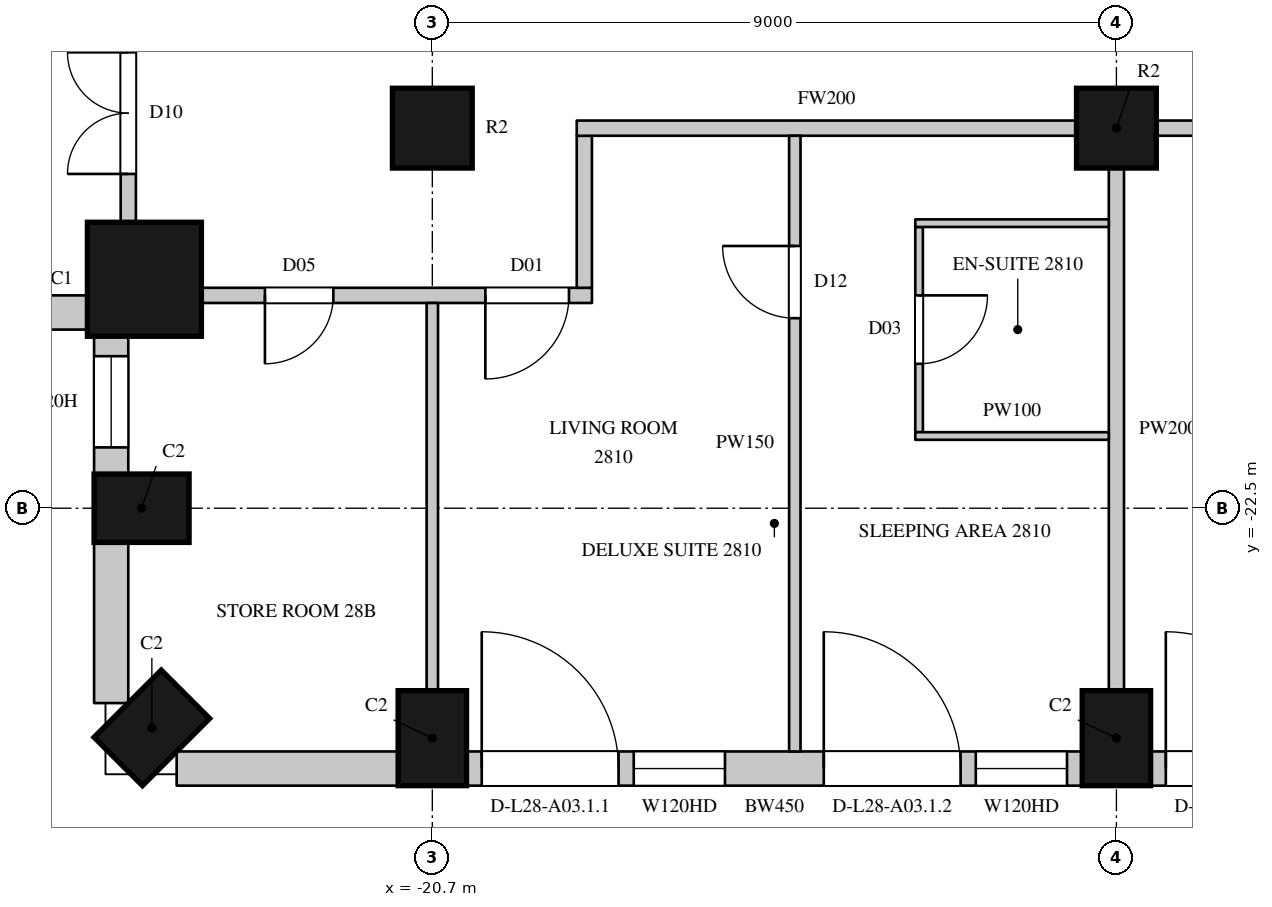
"""IFC4 building model, lengths in metres.
Left out: names, types, materials, properties, quantities, classifications, styles, units other than length and angle.
Written with IfcOpenShell. Run it as: python <this file> out.ifc"""

import sys

from ifc_helpers import new_model, si_unit, direction, frame, frame_2d, origin, origin_2d, place, context, subcontext, project, spatial, rectangle, circle, extrude, element, fill, save


model = new_model("IFC4")
c1 = context("Model", 3, precision=1e-05, world=origin(), true_north=direction((0.0, 1.0)))
c2 = subcontext(c1, "Body", "Model", "MODEL_VIEW")
j1 = project(units=[si_unit("LENGTHUNIT", "METRE"), si_unit("PLANEANGLEUNIT", "RADIAN")], contexts=[c1])
p1 = place(None, origin())
s1 = spatial("IfcSite", under=j1, at=p1, CompositionType="ELEMENT")
p2 = place(p1, origin())
s2 = spatial("IfcBuilding", under=s1, at=p2, CompositionType="ELEMENT")
p3 = place(p2, frame((0.0, 0.0, 131.1)))
s3 = spatial("IfcBuildingStorey", under=s2, at=p3, CompositionType="ELEMENT", Elevation=131.1)
p4 = place(p3, frame((-24.488, -19.488, 0.0), z_axis=(0.0, 0.0, 1.0), x_axis=(1.0, 0.0, 0.0)))
e1 = element("IfcColumn", 1, at=p4, inside=s3, PredefinedType="COLUMN", context=c2, shape_type="SweptSolid", body=[
    extrude(circle(Radius=0.75, at=origin_2d()), origin(), (0.0, 0.0, 1.0), 3.6),
])
for number, where, z_axis, x_axis in (
    (2, (-24.525, -22.5, 0.0), (0.0, 0.0, 1.0), (0.0, -1.0, 0.0)),
    (3, (-24.39, -25.39, 0.0), (0.0, 0.0, 1.0), (0.707, -0.707, 0.0)),
    (4, (-20.7, -25.525, 0.0), (0.0, 0.0, 1.0), (1.0, 0.0, 0.0)),
    (5, (-11.7, -25.525, 0.0), (0.0, 0.0, 1.0), (1.0, 0.0, 0.0)),
):
    element("IfcColumn", number, at=place(p3, frame(where, z_axis=z_axis, x_axis=x_axis)), inside=s3, PredefinedType="COLUMN", context=c2, shape_type="SweptSolid", body=[
        extrude(rectangle(XDim=0.9, YDim=1.25, at=origin_2d()), origin(), (0.0, 0.0, 1.0), 3.6),
    ])
for number, where, z_axis, x_axis in (
    (6, (-20.7, -17.5, 0.0), (0.0, 0.0, 1.0), (1.0, 0.0, 0.0)),
    (7, (-11.7, -17.5, 0.0), (0.0, 0.0, 1.0), (1.0, 0.0, 0.0)),
):
    element("IfcColumn", number, at=place(p3, frame(where, z_axis=z_axis, x_axis=x_axis)), inside=s3, PredefinedType="COLUMN", context=c2, shape_type="SweptSolid", body=[
        extrude(circle(Radius=0.525, at=origin_2d()), origin(), (0.0, 0.0, 1.0), 3.6),
    ])
p5 = place(p3, frame((-29.064, -19.925, 0.0), z_axis=(0.0, 0.0, 1.0), x_axis=(1.0, 0.0, 0.0)))
e8 = element("IfcWall", 8, at=p5, inside=s3, PredefinedType="SOLIDWALL", context=c2, shape_type="SweptSolid", body=[
    extrude(rectangle(XDim=3.857, YDim=0.45, at=frame_2d((1.928, 0.0))), origin(), (0.0, 0.0, 1.0), 3.3),
])
p6 = place(p5, frame((0.514, 0.0, 1.05)))
e9 = element("IfcOpeningElement", 9, at=p6, cuts=e8, PredefinedType="OPENING", context=c2, shape_type="SweptSolid", body=[
    extrude(rectangle(XDim=2.7, YDim=2.0, at=frame_2d((1.35, 1.0))), frame((0.0, 0.235, 0.0), z_axis=(0.0, -1.0, 0.0), x_axis=(1.0, 0.0, 0.0)), (0.0, 0.0, 1.0), 0.47),
])
p7 = place(p3, frame((-24.925, -20.207, 0.0), z_axis=(0.0, 0.0, 1.0), x_axis=(0.0, -1.0, 0.0)))
e10 = element("IfcWall", 10, at=p7, inside=s3, PredefinedType="SOLIDWALL", context=c2, shape_type="SweptSolid", body=[
    extrude(rectangle(XDim=1.843, YDim=0.45, at=frame_2d((0.921, 0.0))), origin(), (0.0, 0.0, 1.0), 3.3),
])
p8 = place(p7, frame((0.293, 0.0, 1.05)))
e11 = element("IfcOpeningElement", 11, at=p8, cuts=e10, PredefinedType="OPENING", context=c2, shape_type="SweptSolid", body=[
    extrude(rectangle(XDim=1.2, YDim=2.0, at=frame_2d((0.6, 1.0))), frame((0.0, 0.235, 0.0), z_axis=(0.0, -1.0, 0.0), x_axis=(1.0, 0.0, 0.0)), (0.0, 0.0, 1.0), 0.47),
])
p9 = place(p3, frame((-24.925, -22.95, 0.0), z_axis=(0.0, 0.0, 1.0), x_axis=(0.0, -1.0, 0.0)))
e12 = element("IfcWall", 12, at=p9, inside=s3, PredefinedType="SOLIDWALL", context=c2, shape_type="SweptSolid", body=[
    extrude(rectangle(XDim=2.114, YDim=0.45, at=frame_2d((1.057, 0.0))), origin(), (0.0, 0.0, 1.0), 3.3),
])
p10 = place(p3, frame((-24.064, -25.925, 0.0), z_axis=(0.0, 0.0, 1.0), x_axis=(1.0, 0.0, 0.0)))
e13 = element("IfcWall", 13, at=p10, inside=s3, PredefinedType="SOLIDWALL", context=c2, shape_type="SweptSolid", body=[
    extrude(rectangle(XDim=2.914, YDim=0.45, at=frame_2d((1.457, 0.0))), origin(), (0.0, 0.0, 1.0), 3.3),
])
p11 = place(p3, frame((-20.25, -25.925, 0.0), z_axis=(0.0, 0.0, 1.0), x_axis=(1.0, 0.0, 0.0)))
e14 = element("IfcWall", 14, at=p11, inside=s3, PredefinedType="SOLIDWALL", context=c2, shape_type="SweptSolid", body=[
    extrude(rectangle(XDim=8.1, YDim=0.45, at=frame_2d((4.05, 0.0))), origin(), (0.0, 0.0, 1.0), 3.3),
])
p12 = place(p11, frame((0.2, 0.0, 0.0)))
e15 = element("IfcOpeningElement", 15, at=p12, cuts=e14, PredefinedType="OPENING", context=c2, shape_type="SweptSolid", body=[
    extrude(rectangle(XDim=1.8, YDim=2.4, at=frame_2d((0.9, 1.2))), frame((0.0, 0.235, 0.0), z_axis=(0.0, -1.0, 0.0), x_axis=(1.0, 0.0, 0.0)), (0.0, 0.0, 1.0), 0.47),
])
p13 = place(p11, frame((2.2, 0.0, 1.05)))
e16 = element("IfcOpeningElement", 16, at=p13, cuts=e14, PredefinedType="OPENING", context=c2, shape_type="SweptSolid", body=[
    extrude(rectangle(XDim=1.2, YDim=2.0, at=frame_2d((0.6, 1.0))), frame((0.0, 0.235, 0.0), z_axis=(0.0, -1.0, 0.0), x_axis=(1.0, 0.0, 0.0)), (0.0, 0.0, 1.0), 0.47),
])
p14 = place(p11, frame((4.7, 0.0, 0.0)))
e17 = element("IfcOpeningElement", 17, at=p14, cuts=e14, PredefinedType="OPENING", context=c2, shape_type="SweptSolid", body=[
    extrude(rectangle(XDim=1.8, YDim=2.4, at=frame_2d((0.9, 1.2))), frame((0.0, 0.235, 0.0), z_axis=(0.0, -1.0, 0.0), x_axis=(1.0, 0.0, 0.0)), (0.0, 0.0, 1.0), 0.47),
])
p15 = place(p11, frame((6.7, 0.0, 1.05)))
e18 = element("IfcOpeningElement", 18, at=p15, cuts=e14, PredefinedType="OPENING", context=c2, shape_type="SweptSolid", body=[
    extrude(rectangle(XDim=1.2, YDim=2.0, at=frame_2d((0.6, 1.0))), frame((0.0, 0.235, 0.0), z_axis=(0.0, -1.0, 0.0), x_axis=(1.0, 0.0, 0.0)), (0.0, 0.0, 1.0), 0.47),
])
p16 = place(p3, frame((-11.25, -25.925, 0.0), z_axis=(0.0, 0.0, 1.0), x_axis=(1.0, 0.0, 0.0)))
e19 = element("IfcWall", 19, at=p16, inside=s3, PredefinedType="SOLIDWALL", context=c2, shape_type="SweptSolid", body=[
    extrude(rectangle(XDim=8.1, YDim=0.45, at=frame_2d((4.05, 0.0))), origin(), (0.0, 0.0, 1.0), 3.3),
])
p17 = place(p16, frame((0.2, 0.0, 0.0)))
e20 = element("IfcOpeningElement", 20, at=p17, cuts=e19, PredefinedType="OPENING", context=c2, shape_type="SweptSolid", body=[
    extrude(rectangle(XDim=1.8, YDim=2.4, at=frame_2d((0.9, 1.2))), frame((0.0, 0.235, 0.0), z_axis=(0.0, -1.0, 0.0), x_axis=(1.0, 0.0, 0.0)), (0.0, 0.0, 1.0), 0.47),
])
p18 = place(p16, frame((2.2, 0.0, 1.05)))
e21 = element("IfcOpeningElement", 21, at=p18, cuts=e19, PredefinedType="OPENING", context=c2, shape_type="SweptSolid", body=[
    extrude(rectangle(XDim=1.2, YDim=2.0, at=frame_2d((0.6, 1.0))), frame((0.0, 0.235, 0.0), z_axis=(0.0, -1.0, 0.0), x_axis=(1.0, 0.0, 0.0)), (0.0, 0.0, 1.0), 0.47),
])
p19 = place(p16, frame((4.25, 0.0, 0.0)))
e22 = element("IfcOpeningElement", 22, at=p19, cuts=e19, PredefinedType="OPENING", context=c2, shape_type="SweptSolid", body=[
    extrude(rectangle(XDim=1.8, YDim=2.4, at=frame_2d((0.9, 1.2))), frame((0.0, 0.235, 0.0), z_axis=(0.0, -1.0, 0.0), x_axis=(1.0, 0.0, 0.0)), (0.0, 0.0, 1.0), 0.47),
])
p20 = place(p16, frame((6.7, 0.0, 1.05)))
e23 = element("IfcOpeningElement", 23, at=p20, cuts=e19, PredefinedType="OPENING", context=c2, shape_type="SweptSolid", body=[
    extrude(rectangle(XDim=1.2, YDim=2.0, at=frame_2d((0.6, 1.0))), frame((0.0, 0.235, 0.0), z_axis=(0.0, -1.0, 0.0), x_axis=(1.0, 0.0, 0.0)), (0.0, 0.0, 1.0), 0.47),
])
p21 = place(p3, frame((-24.7, -18.752, 0.0), z_axis=(0.0, 0.0, 1.0), x_axis=(0.0, 1.0, 0.0)))
e24 = element("IfcWall", 24, at=p21, inside=s3, PredefinedType="PARTITIONING", context=c2, shape_type="SweptSolid", body=[
    extrude(rectangle(XDim=2.722, YDim=0.2, at=frame_2d((1.361, 0.0))), origin(), (0.0, 0.0, 1.0), 3.3),
])
p22 = place(p21, frame((0.65, 0.0, 0.0)))
e25 = element("IfcOpeningElement", 25, at=p22, cuts=e24, PredefinedType="OPENING", context=c2, shape_type="SweptSolid", body=[
    extrude(rectangle(XDim=1.6, YDim=2.4, at=frame_2d((0.8, 1.2))), frame((0.0, 0.11, 0.0), z_axis=(0.0, -1.0, 0.0), x_axis=(1.0, 0.0, 0.0)), (0.0, 0.0, 1.0), 0.22),
])
p23 = place(p3, frame((-23.752, -19.7, 0.0), z_axis=(0.0, 0.0, 1.0), x_axis=(1.0, 0.0, 0.0)))
e26 = element("IfcWall", 26, at=p23, inside=s3, PredefinedType="PARTITIONING", context=c2, shape_type="SweptSolid", body=[
    extrude(rectangle(XDim=5.152, YDim=0.2, at=frame_2d((2.576, 0.0))), origin(), (0.0, 0.0, 1.0), 3.3),
])
p24 = place(p23, frame((0.85, 0.0, 0.0)))
e27 = element("IfcOpeningElement", 27, at=p24, cuts=e26, PredefinedType="OPENING", context=c2, shape_type="SweptSolid", body=[
    extrude(rectangle(XDim=0.9, YDim=2.2, at=frame_2d((0.45, 1.1))), frame((0.0, 0.11, 0.0), z_axis=(0.0, -1.0, 0.0), x_axis=(1.0, 0.0, 0.0)), (0.0, 0.0, 1.0), 0.22),
])
p25 = place(p23, frame((3.75, 0.0, 0.0)))
e28 = element("IfcOpeningElement", 28, at=p25, cuts=e26, PredefinedType="OPENING", context=c2, shape_type="SweptSolid", body=[
    extrude(rectangle(XDim=1.1, YDim=2.4, at=frame_2d((0.55, 1.2))), frame((0.0, 0.11, 0.0), z_axis=(0.0, -1.0, 0.0), x_axis=(1.0, 0.0, 0.0)), (0.0, 0.0, 1.0), 0.22),
])
p26 = place(p3, frame((-18.7, -19.6, 0.0), z_axis=(0.0, 0.0, 1.0), x_axis=(0.0, 1.0, 0.0)))
e29 = element("IfcWall", 29, at=p26, inside=s3, PredefinedType="PARTITIONING", context=c2, shape_type="SweptSolid", body=[
    extrude(rectangle(XDim=2.0, YDim=0.2, at=frame_2d((1.0, 0.0))), origin(), (0.0, 0.0, 1.0), 3.3),
])
p27 = place(p3, frame((-18.8, -17.5, 0.0), z_axis=(0.0, 0.0, 1.0), x_axis=(1.0, 0.0, 0.0)))
e30 = element("IfcWall", 30, at=p27, inside=s3, PredefinedType="PARTITIONING", context=c2, shape_type="SweptSolid", body=[
    extrude(rectangle(XDim=6.575, YDim=0.2, at=frame_2d((3.288, 0.0))), origin(), (0.0, 0.0, 1.0), 2.75),
])
p28 = place(p3, frame((-11.175, -17.5, 0.0), z_axis=(0.0, 0.0, 1.0), x_axis=(1.0, 0.0, 0.0)))
e31 = element("IfcWall", 31, at=p28, inside=s3, PredefinedType="PARTITIONING", context=c2, shape_type="SweptSolid", body=[
    extrude(rectangle(XDim=7.95, YDim=0.2, at=frame_2d((3.975, 0.0))), origin(), (0.0, 0.0, 1.0), 2.75),
])
p29 = place(p28, frame((2.75, 0.0, 0.0)))
e32 = element("IfcOpeningElement", 32, at=p29, cuts=e31, PredefinedType="OPENING", context=c2, shape_type="SweptSolid", body=[
    extrude(rectangle(XDim=1.1, YDim=2.4, at=frame_2d((0.55, 1.2))), frame((0.0, 0.11, 0.0), z_axis=(0.0, -1.0, 0.0), x_axis=(1.0, 0.0, 0.0)), (0.0, 0.0, 1.0), 0.22),
])
p30 = place(p3, frame((-20.7, -24.9, 0.0), z_axis=(0.0, 0.0, 1.0), x_axis=(0.0, 1.0, 0.0)))
e33 = element("IfcWall", 33, at=p30, inside=s3, PredefinedType="PARTITIONING", context=c2, shape_type="SweptSolid", body=[
    extrude(rectangle(XDim=5.1, YDim=0.15, at=frame_2d((2.55, 0.0))), origin(), (0.0, 0.0, 1.0), 2.75),
])
p31 = place(p3, frame((-15.931, -25.7, 0.0), z_axis=(0.0, 0.0, 1.0), x_axis=(0.0, 1.0, 0.0)))
e34 = element("IfcWall", 34, at=p31, inside=s3, PredefinedType="PARTITIONING", context=c2, shape_type="SweptSolid", body=[
    extrude(rectangle(XDim=8.1, YDim=0.15, at=frame_2d((4.05, 0.0))), origin(), (0.0, 0.0, 1.0), 3.3),
])
p32 = place(p31, frame((5.7, 0.0, 0.0)))
e35 = element("IfcOpeningElement", 35, at=p32, cuts=e34, PredefinedType="OPENING", context=c2, shape_type="SweptSolid", body=[
    extrude(rectangle(XDim=0.95, YDim=2.2, at=frame_2d((0.475, 1.1))), frame((0.0, 0.085, 0.0), z_axis=(0.0, -1.0, 0.0), x_axis=(1.0, 0.0, 0.0)), (0.0, 0.0, 1.0), 0.17),
])
p33 = place(p3, frame((-11.7, -24.9, 0.0), z_axis=(0.0, 0.0, 1.0), x_axis=(0.0, 1.0, 0.0)))
e36 = element("IfcWall", 36, at=p33, inside=s3, PredefinedType="PARTITIONING", context=c2, shape_type="SweptSolid", body=[
    extrude(rectangle(XDim=6.875, YDim=0.2, at=frame_2d((3.438, 0.0))), origin(), (0.0, 0.0, 1.0), 2.75),
])
p34 = place(p3, frame((-14.296, -21.5, 0.0), z_axis=(0.0, 0.0, 1.0), x_axis=(0.0, 1.0, 0.0)))
e37 = element("IfcWall", 37, at=p34, inside=s3, PredefinedType="PARTITIONING", context=c2, shape_type="SweptSolid", body=[
    extrude(rectangle(XDim=2.7, YDim=0.1, at=frame_2d((1.35, 0.0))), origin(), (0.0, 0.0, 1.0), 3.3),
])
p35 = place(p34, frame((0.9, 0.0, 0.0)))
e38 = element("IfcOpeningElement", 38, at=p35, cuts=e37, PredefinedType="OPENING", context=c2, shape_type="SweptSolid", body=[
    extrude(rectangle(XDim=0.9, YDim=2.2, at=frame_2d((0.45, 1.1))), frame((0.0, 0.06, 0.0), z_axis=(0.0, -1.0, 0.0), x_axis=(1.0, 0.0, 0.0)), (0.0, 0.0, 1.0), 0.12),
])
for number, where, z_axis, x_axis in (
    (39, (-14.346, -21.55, 0.0), (0.0, 0.0, 1.0), (1.0, 0.0, 0.0)),
    (40, (-14.346, -18.75, 0.0), (0.0, 0.0, 1.0), (1.0, 0.0, 0.0)),
):
    element("IfcWall", number, at=place(p3, frame(where, z_axis=z_axis, x_axis=x_axis)), inside=s3, PredefinedType="PARTITIONING", context=c2, shape_type="SweptSolid", body=[
        extrude(rectangle(XDim=2.546, YDim=0.1, at=frame_2d((1.273, 0.0))), origin(), (0.0, 0.0, 1.0), 3.3),
    ])
p36 = place(p8, origin())
e41 = element("IfcWindow", 41, at=p36, inside=s3, PartitioningType="SINGLE_PANEL", PredefinedType="WINDOW", context=c2, shape_type="SweptSolid", body=[
    extrude(rectangle(XDim=1.2, YDim=2.0, at=frame_2d((0.6, 1.0))), frame((0.0, 0.135, 0.0), z_axis=(0.0, -1.0, 0.0), x_axis=(1.0, 0.0, 0.0)), (0.0, 0.0, 1.0), 0.06),
])
fill(e11, e41)
p37 = place(p12, origin())
e42 = element("IfcDoor", 42, at=p37, inside=s3, OperationType="SLIDING_TO_LEFT", PredefinedType="DOOR", context=c2, shape_type="SweptSolid", body=[
    extrude(rectangle(XDim=1.8, YDim=2.4, at=frame_2d((0.9, 1.2))), frame((0.0, 0.13, 0.0), z_axis=(0.0, -1.0, 0.0), x_axis=(1.0, 0.0, 0.0)), (0.0, 0.0, 1.0), 0.05),
])
fill(e15, e42)
p38 = place(p13, origin())
e43 = element("IfcWindow", 43, at=p38, inside=s3, PartitioningType="SINGLE_PANEL", PredefinedType="WINDOW", context=c2, shape_type="SweptSolid", body=[
    extrude(rectangle(XDim=1.2, YDim=2.0, at=frame_2d((0.6, 1.0))), frame((0.0, 0.135, 0.0), z_axis=(0.0, -1.0, 0.0), x_axis=(1.0, 0.0, 0.0)), (0.0, 0.0, 1.0), 0.06),
])
fill(e16, e43)
p39 = place(p14, origin())
e44 = element("IfcDoor", 44, at=p39, inside=s3, OperationType="SLIDING_TO_LEFT", PredefinedType="DOOR", context=c2, shape_type="SweptSolid", body=[
    extrude(rectangle(XDim=1.8, YDim=2.4, at=frame_2d((0.9, 1.2))), frame((0.0, 0.13, 0.0), z_axis=(0.0, -1.0, 0.0), x_axis=(1.0, 0.0, 0.0)), (0.0, 0.0, 1.0), 0.05),
])
fill(e17, e44)
p40 = place(p15, origin())
e45 = element("IfcWindow", 45, at=p40, inside=s3, PartitioningType="SINGLE_PANEL", PredefinedType="WINDOW", context=c2, shape_type="SweptSolid", body=[
    extrude(rectangle(XDim=1.2, YDim=2.0, at=frame_2d((0.6, 1.0))), frame((0.0, 0.135, 0.0), z_axis=(0.0, -1.0, 0.0), x_axis=(1.0, 0.0, 0.0)), (0.0, 0.0, 1.0), 0.06),
])
fill(e18, e45)
p41 = place(p17, origin())
e46 = element("IfcDoor", 46, at=p41, inside=s3, OperationType="SLIDING_TO_LEFT", PredefinedType="DOOR", context=c2, shape_type="SweptSolid", body=[
    extrude(rectangle(XDim=1.8, YDim=2.4, at=frame_2d((0.9, 1.2))), frame((0.0, 0.13, 0.0), z_axis=(0.0, -1.0, 0.0), x_axis=(1.0, 0.0, 0.0)), (0.0, 0.0, 1.0), 0.05),
])
fill(e20, e46)
p42 = place(p24, origin())
e47 = element("IfcDoor", 47, at=p42, inside=s3, OperationType="SINGLE_SWING_RIGHT", PredefinedType="DOOR", context=c2, shape_type="SweptSolid", body=[
    extrude(rectangle(XDim=0.9, YDim=2.2, at=frame_2d((0.45, 1.1))), frame((0.0, 0.025, 0.0), z_axis=(0.0, -1.0, 0.0), x_axis=(1.0, 0.0, 0.0)), (0.0, 0.0, 1.0), 0.05),
])
fill(e27, e47)
p43 = place(p22, origin())
e48 = element("IfcDoor", 48, at=p43, inside=s3, OperationType="DOUBLE_DOOR_SINGLE_SWING", PredefinedType="DOOR", context=c2, shape_type="SweptSolid", body=[
    extrude(rectangle(XDim=1.6, YDim=2.4, at=frame_2d((0.8, 1.2))), frame((0.0, 0.025, 0.0), z_axis=(0.0, -1.0, 0.0), x_axis=(1.0, 0.0, 0.0)), (0.0, 0.0, 1.0), 0.05),
])
fill(e25, e48)
p44 = place(p25, origin())
e49 = element("IfcDoor", 49, at=p44, inside=s3, OperationType="SINGLE_SWING_RIGHT", PredefinedType="DOOR", context=c2, shape_type="SweptSolid", body=[
    extrude(rectangle(XDim=1.1, YDim=2.4, at=frame_2d((0.55, 1.2))), frame((0.0, 0.025, 0.0), z_axis=(0.0, -1.0, 0.0), x_axis=(1.0, 0.0, 0.0)), (0.0, 0.0, 1.0), 0.05),
])
fill(e28, e49)
p45 = place(p32, origin())
e50 = element("IfcDoor", 50, at=p45, inside=s3, OperationType="SINGLE_SWING_RIGHT", PredefinedType="DOOR", context=c2, shape_type="SweptSolid", body=[
    extrude(rectangle(XDim=0.95, YDim=2.2, at=frame_2d((0.475, 1.1))), frame((0.0, 0.025, 0.0), z_axis=(0.0, -1.0, 0.0), x_axis=(1.0, 0.0, 0.0)), (0.0, 0.0, 1.0), 0.05),
])
fill(e35, e50)
p46 = place(p35, origin())
e51 = element("IfcDoor", 51, at=p46, inside=s3, OperationType="SINGLE_SWING_LEFT", PredefinedType="DOOR", context=c2, shape_type="SweptSolid", body=[
    extrude(rectangle(XDim=0.9, YDim=2.2, at=frame_2d((0.45, 1.1))), frame((0.0, 0.025, 0.0), z_axis=(0.0, -1.0, 0.0), x_axis=(1.0, 0.0, 0.0)), (0.0, 0.0, 1.0), 0.05),
])
fill(e38, e51)
save(model, sys.argv[1])
